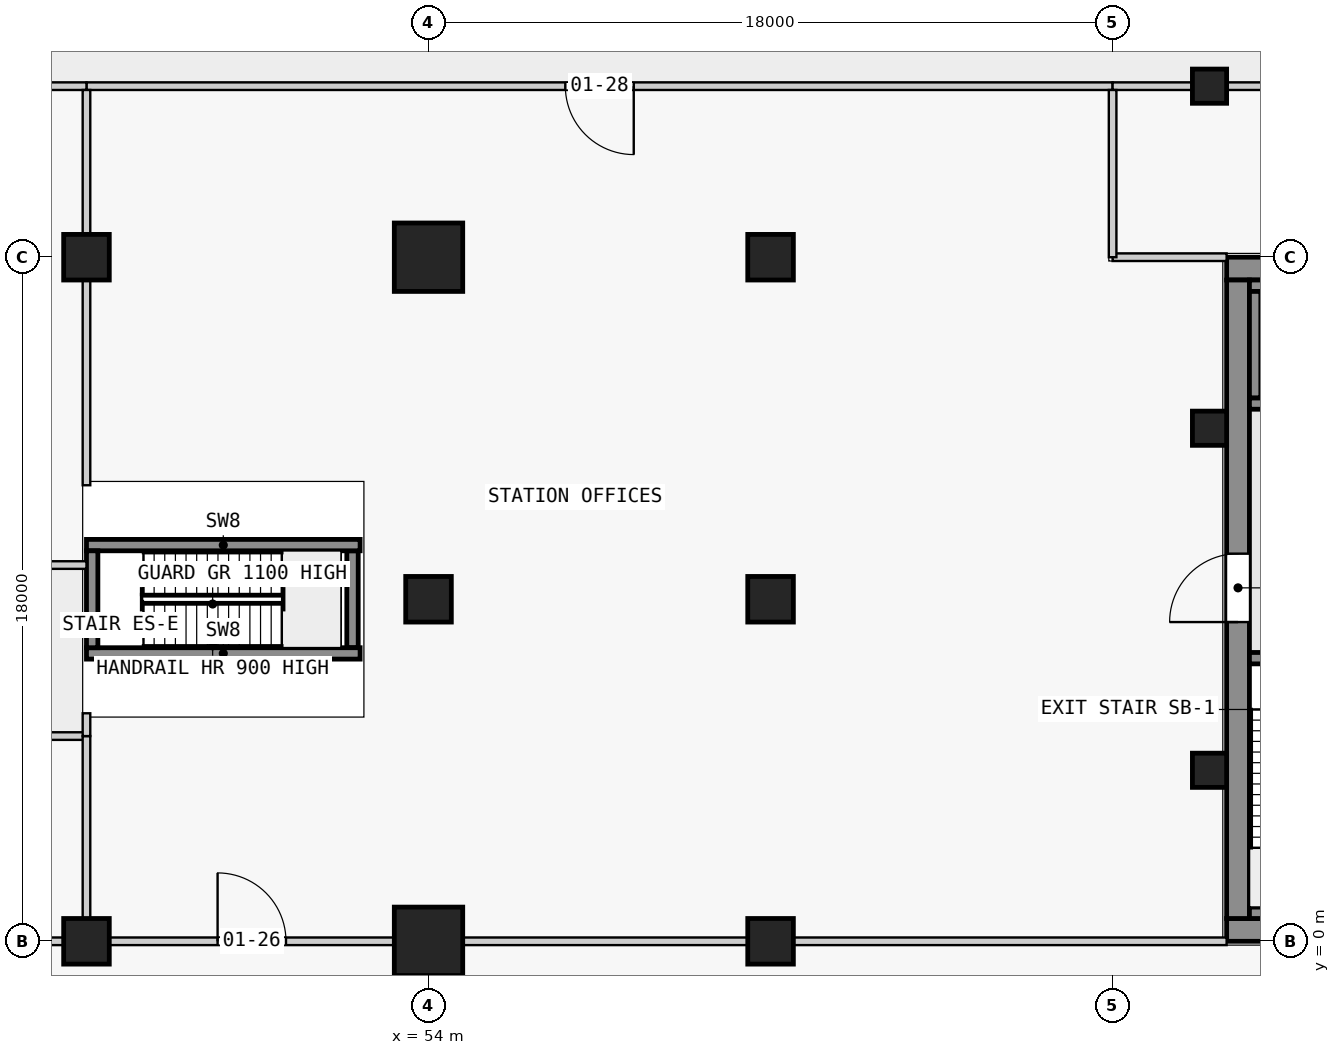
"""IFC4 building model, lengths in metres.
Left out: names, types, materials, properties, quantities, classifications, styles, units other than length and angle.
Written with IfcOpenShell. Run it as: python <this file> out.ifc"""

import sys

from ifc_helpers import new_model, si_unit, direction, frame, frame_2d, origin, origin_2d, place, context, subcontext, project, spatial, rectangle, extrude, element, fill, save


model = new_model("IFC4")
c1 = context("Model", 3, precision=1e-05, world=origin(), true_north=direction((0.0, 1.0)))
c2 = subcontext(c1, "Body", "Model", "MODEL_VIEW")
j1 = project(units=[si_unit("LENGTHUNIT", "METRE"), si_unit("PLANEANGLEUNIT", "RADIAN")], contexts=[c1])
p1 = place(None, origin())
s1 = spatial("IfcSite", under=j1, at=p1, CompositionType="ELEMENT")
p2 = place(p1, origin())
s2 = spatial("IfcBuilding", under=s1, at=p2, CompositionType="ELEMENT")
p3 = place(p2, frame((0.0, 0.0, 8.0)))
s3 = spatial("IfcBuildingStorey", under=s2, at=p3, CompositionType="ELEMENT", Elevation=8.0)
for number, where, z_axis, x_axis in (
    (1, (45.0, 0.0, 0.0), (0.0, 0.0, 1.0), (1.0, 0.0, 0.0)),
    (2, (45.0, 18.0, 0.0), (0.0, 0.0, 1.0), (1.0, 0.0, 0.0)),
):
    element("IfcColumn", number, at=place(p3, frame(where, z_axis=z_axis, x_axis=x_axis)), inside=s3, PredefinedType="COLUMN", context=c2, shape_type="SweptSolid", body=[
        extrude(rectangle(XDim=1.2, YDim=1.2, at=origin_2d()), origin(), (0.0, 0.0, 1.0), 4.8),
    ])
p4 = place(p3, frame((54.0, 0.0, 0.0), z_axis=(0.0, 0.0, 1.0), x_axis=(1.0, 0.0, 0.0)))
e3 = element("IfcColumn", 3, at=p4, inside=s3, PredefinedType="COLUMN", context=c2, shape_type="SweptSolid", body=[
    extrude(rectangle(XDim=1.8, YDim=1.8, at=origin_2d()), origin(), (0.0, 0.0, 1.0), 4.8),
])
p5 = place(p3, frame((54.0, 9.0, 0.0), z_axis=(0.0, 0.0, 1.0), x_axis=(1.0, 0.0, 0.0)))
e4 = element("IfcColumn", 4, at=p5, inside=s3, PredefinedType="COLUMN", context=c2, shape_type="SweptSolid", body=[
    extrude(rectangle(XDim=1.2, YDim=1.2, at=origin_2d()), origin(), (0.0, 0.0, 1.0), 4.8),
])
p6 = place(p3, frame((54.0, 18.0, 0.0), z_axis=(0.0, 0.0, 1.0), x_axis=(1.0, 0.0, 0.0)))
e5 = element("IfcColumn", 5, at=p6, inside=s3, PredefinedType="COLUMN", context=c2, shape_type="SweptSolid", body=[
    extrude(rectangle(XDim=1.8, YDim=1.8, at=origin_2d()), origin(), (0.0, 0.0, 1.0), 4.8),
])
for number, where, z_axis, x_axis in (
    (6, (63.0, 0.0, 0.0), (0.0, 0.0, 1.0), (1.0, 0.0, 0.0)),
    (7, (63.0, 9.0, 0.0), (0.0, 0.0, 1.0), (1.0, 0.0, 0.0)),
    (8, (63.0, 18.0, 0.0), (0.0, 0.0, 1.0), (1.0, 0.0, 0.0)),
):
    element("IfcColumn", number, at=place(p3, frame(where, z_axis=z_axis, x_axis=x_axis)), inside=s3, PredefinedType="COLUMN", context=c2, shape_type="SweptSolid", body=[
        extrude(rectangle(XDim=1.2, YDim=1.2, at=origin_2d()), origin(), (0.0, 0.0, 1.0), 4.8),
    ])
for number, where, z_axis, x_axis in (
    (9, (74.55, 22.5, 0.0), (0.0, 0.0, 1.0), (1.0, 0.0, 0.0)),
    (10, (74.55, 13.5, 0.0), (0.0, 0.0, 1.0), (1.0, 0.0, 0.0)),
    (11, (74.55, 4.5, 0.0), (0.0, 0.0, 1.0), (1.0, 0.0, 0.0)),
):
    element("IfcColumn", number, at=place(p3, frame(where, z_axis=z_axis, x_axis=x_axis)), inside=s3, PredefinedType="COLUMN", context=c2, shape_type="SweptSolid", body=[
        extrude(rectangle(XDim=0.9, YDim=0.9, at=origin_2d()), origin(), (0.0, 0.0, 1.0), 4.8),
    ])
for number, where, z_axis, x_axis in (
    (12, (75.0, 0.3, 0.0), (0.0, 0.0, 1.0), (1.0, 0.0, 0.0)),
    (13, (75.0, 17.7, 0.0), (0.0, 0.0, 1.0), (1.0, 0.0, 0.0)),
):
    element("IfcWall", number, at=place(p3, frame(where, z_axis=z_axis, x_axis=x_axis)), inside=s3, PredefinedType="SHEAR", context=c2, shape_type="SweptSolid", body=[
        extrude(rectangle(XDim=14.5, YDim=0.6, at=frame_2d((7.25, 0.0))), origin(), (0.0, 0.0, 1.0), 4.45),
    ])
p7 = place(p3, frame((75.3, 0.6, 0.0), z_axis=(0.0, 0.0, 1.0), x_axis=(0.0, 1.0, 0.0)))
e14 = element("IfcWall", 14, at=p7, inside=s3, PredefinedType="SHEAR", context=c2, shape_type="SweptSolid", body=[
    extrude(rectangle(XDim=16.8, YDim=0.6, at=frame_2d((8.4, 0.0))), origin(), (0.0, 0.0, 1.0), 4.45),
])
p8 = place(p7, frame((7.8, 0.0, 0.0)))
e15 = element("IfcOpeningElement", 15, at=p8, cuts=e14, PredefinedType="OPENING", context=c2, shape_type="SweptSolid", body=[
    extrude(rectangle(XDim=1.8, YDim=2.1, at=frame_2d((0.9, 1.05))), frame((0.0, 0.31, 0.0), z_axis=(0.0, -1.0, 0.0), x_axis=(1.0, 0.0, 0.0)), (0.0, 0.0, 1.0), 0.62),
])
p9 = place(p3, frame((75.6, 0.75, 0.0), z_axis=(0.0, 0.0, 1.0), x_axis=(1.0, 0.0, 0.0)))
e16 = element("IfcWall", 16, at=p9, inside=s3, PredefinedType="SHEAR", context=c2, shape_type="SweptSolid", body=[
    extrude(rectangle(XDim=5.7, YDim=0.3, at=frame_2d((2.85, 0.0))), origin(), (0.0, 0.0, 1.0), 4.45),
])
p10 = place(p3, frame((75.6, 7.45, 0.0), z_axis=(0.0, 0.0, 1.0), x_axis=(1.0, 0.0, 0.0)))
e17 = element("IfcWall", 17, at=p10, inside=s3, PredefinedType="SHEAR", context=c2, shape_type="SweptSolid", body=[
    extrude(rectangle(XDim=5.7, YDim=0.3, at=frame_2d((2.85, 0.0))), origin(), (0.0, 0.0, 1.0), 4.45),
])
p11 = place(p10, frame((0.75, 0.0, 0.0)))
e18 = element("IfcOpeningElement", 18, at=p11, cuts=e17, PredefinedType="OPENING", context=c2, shape_type="SweptSolid", body=[
    extrude(rectangle(XDim=1.1, YDim=2.1, at=frame_2d((0.55, 1.05))), frame((0.0, 0.16, 0.0), z_axis=(0.0, -1.0, 0.0), x_axis=(1.0, 0.0, 0.0)), (0.0, 0.0, 1.0), 0.32),
])
p12 = place(p10, frame((3.55, 0.0, 0.0)))
e19 = element("IfcOpeningElement", 19, at=p12, cuts=e17, PredefinedType="OPENING", context=c2, shape_type="SweptSolid", body=[
    extrude(rectangle(XDim=1.1, YDim=2.1, at=frame_2d((0.55, 1.05))), frame((0.0, 0.16, 0.0), z_axis=(0.0, -1.0, 0.0), x_axis=(1.0, 0.0, 0.0)), (0.0, 0.0, 1.0), 0.32),
])
p13 = place(p3, frame((75.6, 17.25, 0.0), z_axis=(0.0, 0.0, 1.0), x_axis=(1.0, 0.0, 0.0)))
e20 = element("IfcWall", 20, at=p13, inside=s3, PredefinedType="SHEAR", context=c2, shape_type="SweptSolid", body=[
    extrude(rectangle(XDim=9.9, YDim=0.3, at=frame_2d((4.95, 0.0))), origin(), (0.0, 0.0, 1.0), 4.45),
])
p14 = place(p3, frame((75.6, 14.15, 0.0), z_axis=(0.0, 0.0, 1.0), x_axis=(1.0, 0.0, 0.0)))
e21 = element("IfcWall", 21, at=p14, inside=s3, PredefinedType="SHEAR", context=c2, shape_type="SweptSolid", body=[
    extrude(rectangle(XDim=9.9, YDim=0.3, at=frame_2d((4.95, 0.0))), origin(), (0.0, 0.0, 1.0), 4.45),
])
p15 = place(p14, frame((0.85, 0.0, 0.0)))
e22 = element("IfcOpeningElement", 22, at=p15, cuts=e21, PredefinedType="OPENING", context=c2, shape_type="SweptSolid", body=[
    extrude(rectangle(XDim=1.1, YDim=2.1, at=frame_2d((0.55, 1.05))), frame((0.0, 0.16, 0.0), z_axis=(0.0, -1.0, 0.0), x_axis=(1.0, 0.0, 0.0)), (0.0, 0.0, 1.0), 0.32),
])
p16 = place(p14, frame((3.35, 0.0, 0.0)))
e23 = element("IfcOpeningElement", 23, at=p16, cuts=e21, PredefinedType="OPENING", context=c2, shape_type="SweptSolid", body=[
    extrude(rectangle(XDim=1.1, YDim=2.1, at=frame_2d((0.55, 1.05))), frame((0.0, 0.16, 0.0), z_axis=(0.0, -1.0, 0.0), x_axis=(1.0, 0.0, 0.0)), (0.0, 0.0, 1.0), 0.32),
])
p17 = place(p14, frame((5.75, 0.0, 0.0)))
e24 = element("IfcOpeningElement", 24, at=p17, cuts=e21, PredefinedType="OPENING", context=c2, shape_type="SweptSolid", body=[
    extrude(rectangle(XDim=1.1, YDim=2.1, at=frame_2d((0.55, 1.05))), frame((0.0, 0.16, 0.0), z_axis=(0.0, -1.0, 0.0), x_axis=(1.0, 0.0, 0.0)), (0.0, 0.0, 1.0), 0.32),
])
p18 = place(p14, frame((8.05, 0.0, 0.0)))
e25 = element("IfcOpeningElement", 25, at=p18, cuts=e21, PredefinedType="OPENING", context=c2, shape_type="SweptSolid", body=[
    extrude(rectangle(XDim=1.1, YDim=2.1, at=frame_2d((0.55, 1.05))), frame((0.0, 0.16, 0.0), z_axis=(0.0, -1.0, 0.0), x_axis=(1.0, 0.0, 0.0)), (0.0, 0.0, 1.0), 0.32),
])
p19 = place(p3, frame((75.75, 14.3, 0.0), z_axis=(0.0, 0.0, 1.0), x_axis=(0.0, 1.0, 0.0)))
e26 = element("IfcWall", 26, at=p19, inside=s3, PredefinedType="SHEAR", context=c2, shape_type="SweptSolid", body=[
    extrude(rectangle(XDim=2.8, YDim=0.3, at=frame_2d((1.4, 0.0))), origin(), (0.0, 0.0, 1.0), 4.45),
])
for number, where, z_axis, x_axis in (
    (27, (45.15, 7.725, 0.0), (0.0, 0.0, 1.0), (0.0, 1.0, 0.0)),
    (28, (52.0, 7.725, 0.0), (0.0, 0.0, 1.0), (0.0, 1.0, 0.0)),
):
    element("IfcWall", number, at=place(p3, frame(where, z_axis=z_axis, x_axis=x_axis)), inside=s3, PredefinedType="SHEAR", context=c2, shape_type="SweptSolid", body=[
        extrude(rectangle(XDim=2.55, YDim=0.3, at=frame_2d((1.275, 0.0))), origin(), (0.0, 0.0, 1.0), 4.8),
    ])
for number, where, z_axis, x_axis in (
    (29, (45.0, 7.575, 0.0), (0.0, 0.0, 1.0), (1.0, 0.0, 0.0)),
    (30, (45.0, 10.425, 0.0), (0.0, 0.0, 1.0), (1.0, 0.0, 0.0)),
):
    element("IfcWall", number, at=place(p3, frame(where, z_axis=z_axis, x_axis=x_axis)), inside=s3, PredefinedType="SHEAR", context=c2, shape_type="SweptSolid", body=[
        extrude(rectangle(XDim=7.2, YDim=0.3, at=frame_2d((3.6, 0.0))), origin(), (0.0, 0.0, 1.0), 4.8),
    ])
p20 = place(p3, frame((45.6, 0.0, 0.0), z_axis=(0.0, 0.0, 1.0), x_axis=(1.0, 0.0, 0.0)))
e31 = element("IfcWall", 31, at=p20, inside=s3, PredefinedType="PARTITIONING", context=c2, shape_type="SweptSolid", body=[
    extrude(rectangle(XDim=7.5, YDim=0.2, at=frame_2d((3.75, 0.0))), origin(), (0.0, 0.0, 1.0), 3.75),
])
p21 = place(p20, frame((2.85, 0.0, 0.0)))
e32 = element("IfcOpeningElement", 32, at=p21, cuts=e31, PredefinedType="OPENING", context=c2, shape_type="SweptSolid", body=[
    extrude(rectangle(XDim=1.8, YDim=2.1, at=frame_2d((0.9, 1.05))), frame((0.0, 0.11, 0.0), z_axis=(0.0, -1.0, 0.0), x_axis=(1.0, 0.0, 0.0)), (0.0, 0.0, 1.0), 0.22),
])
p22 = place(p3, frame((54.9, 0.0, 0.0), z_axis=(0.0, 0.0, 1.0), x_axis=(1.0, 0.0, 0.0)))
e33 = element("IfcWall", 33, at=p22, inside=s3, PredefinedType="PARTITIONING", context=c2, shape_type="SweptSolid", body=[
    extrude(rectangle(XDim=7.5, YDim=0.2, at=frame_2d((3.75, 0.0))), origin(), (0.0, 0.0, 1.0), 3.75),
])
p23 = place(p3, frame((63.6, 0.0, 0.0), z_axis=(0.0, 0.0, 1.0), x_axis=(1.0, 0.0, 0.0)))
e34 = element("IfcWall", 34, at=p23, inside=s3, PredefinedType="PARTITIONING", context=c2, shape_type="SweptSolid", body=[
    extrude(rectangle(XDim=11.4, YDim=0.2, at=frame_2d((5.7, 0.0))), origin(), (0.0, 0.0, 1.0), 4.45),
])
p24 = place(p3, frame((72.0, 22.5, 0.0), z_axis=(0.0, 0.0, 1.0), x_axis=(-1.0, 0.0, 0.0)))
e35 = element("IfcWall", 35, at=p24, inside=s3, PredefinedType="PARTITIONING", context=c2, shape_type="SweptSolid", body=[
    extrude(rectangle(XDim=27.0, YDim=0.2, at=frame_2d((13.5, 0.0))), origin(), (0.0, 0.0, 1.0), 3.75),
])
p25 = place(p24, frame((12.6, 0.0, 0.0)))
e36 = element("IfcOpeningElement", 36, at=p25, cuts=e35, PredefinedType="OPENING", context=c2, shape_type="SweptSolid", body=[
    extrude(rectangle(XDim=1.8, YDim=2.1, at=frame_2d((0.9, 1.05))), frame((0.0, 0.11, 0.0), z_axis=(0.0, -1.0, 0.0), x_axis=(1.0, 0.0, 0.0)), (0.0, 0.0, 1.0), 0.22),
])
p26 = place(p3, frame((82.05, 22.5, 0.0), z_axis=(0.0, 0.0, 1.0), x_axis=(-1.0, 0.0, 0.0)))
e37 = element("IfcWall", 37, at=p26, inside=s3, PredefinedType="PARTITIONING", context=c2, shape_type="SweptSolid", body=[
    extrude(rectangle(XDim=7.05, YDim=0.2, at=frame_2d((3.525, 0.0))), origin(), (0.0, 0.0, 1.0), 4.45),
])
p27 = place(p3, frame((74.1, 22.5, 0.0), z_axis=(0.0, 0.0, 1.0), x_axis=(-1.0, 0.0, 0.0)))
e38 = element("IfcWall", 38, at=p27, inside=s3, PredefinedType="PARTITIONING", context=c2, shape_type="SweptSolid", body=[
    extrude(rectangle(XDim=2.1, YDim=0.2, at=frame_2d((1.05, 0.0))), origin(), (0.0, 0.0, 1.0), 4.45),
])
p28 = place(p3, frame((45.0, 22.5, 0.0), z_axis=(0.0, 0.0, 1.0), x_axis=(-1.0, 0.0, 0.0)))
e39 = element("IfcWall", 39, at=p28, inside=s3, PredefinedType="PARTITIONING", context=c2, shape_type="SweptSolid", body=[
    extrude(rectangle(XDim=18.0, YDim=0.2, at=frame_2d((9.0, 0.0))), origin(), (0.0, 0.0, 1.0), 3.75),
])
p29 = place(p28, frame((8.1, 0.0, 0.0)))
e40 = element("IfcOpeningElement", 40, at=p29, cuts=e39, PredefinedType="OPENING", context=c2, shape_type="SweptSolid", body=[
    extrude(rectangle(XDim=1.8, YDim=2.1, at=frame_2d((0.9, 1.05))), frame((0.0, 0.11, 0.0), z_axis=(0.0, -1.0, 0.0), x_axis=(1.0, 0.0, 0.0)), (0.0, 0.0, 1.0), 0.22),
])
p30 = place(p3, frame((36.9, 0.0, 0.0), z_axis=(0.0, 0.0, 1.0), x_axis=(1.0, 0.0, 0.0)))
e41 = element("IfcWall", 41, at=p30, inside=s3, PredefinedType="PARTITIONING", context=c2, shape_type="SweptSolid", body=[
    extrude(rectangle(XDim=7.5, YDim=0.2, at=frame_2d((3.75, 0.0))), origin(), (0.0, 0.0, 1.0), 3.75),
])
p31 = place(p3, frame((27.0, 9.9, 0.0), z_axis=(0.0, 0.0, 1.0), x_axis=(1.0, 0.0, 0.0)))
e42 = element("IfcWall", 42, at=p31, inside=s3, PredefinedType="PARTITIONING", context=c2, shape_type="SweptSolid", body=[
    extrude(rectangle(XDim=18.0, YDim=0.2, at=frame_2d((9.0, 0.0))), origin(), (0.0, 0.0, 1.0), 3.75),
])
p32 = place(p31, frame((6.35, 0.0, 0.0)))
e43 = element("IfcOpeningElement", 43, at=p32, cuts=e42, PredefinedType="OPENING", context=c2, shape_type="SweptSolid", body=[
    extrude(rectangle(XDim=1.8, YDim=2.1, at=frame_2d((0.9, 1.05))), frame((0.0, 0.11, 0.0), z_axis=(0.0, -1.0, 0.0), x_axis=(1.0, 0.0, 0.0)), (0.0, 0.0, 1.0), 0.22),
])
p33 = place(p3, frame((45.0, 5.4, 0.0), z_axis=(0.0, 0.0, 1.0), x_axis=(-1.0, 0.0, 0.0)))
e44 = element("IfcWall", 44, at=p33, inside=s3, PredefinedType="PARTITIONING", context=c2, shape_type="SweptSolid", body=[
    extrude(rectangle(XDim=18.0, YDim=0.2, at=frame_2d((9.0, 0.0))), origin(), (0.0, 0.0, 1.0), 3.75),
])
p34 = place(p3, frame((45.0, 22.4, 0.0), z_axis=(0.0, 0.0, 1.0), x_axis=(0.0, -1.0, 0.0)))
e45 = element("IfcWall", 45, at=p34, inside=s3, PredefinedType="PARTITIONING", context=c2, shape_type="SweptSolid", body=[
    extrude(rectangle(XDim=3.8, YDim=0.2, at=frame_2d((1.9, 0.0))), origin(), (0.0, 0.0, 1.0), 3.75),
])
p35 = place(p3, frame((45.0, 17.4, 0.0), z_axis=(0.0, 0.0, 1.0), x_axis=(0.0, -1.0, 0.0)))
e46 = element("IfcWall", 46, at=p35, inside=s3, PredefinedType="PARTITIONING", context=c2, shape_type="SweptSolid", body=[
    extrude(rectangle(XDim=5.4, YDim=0.2, at=frame_2d((2.7, 0.0))), origin(), (0.0, 0.0, 1.0), 4.45),
])
p36 = place(p3, frame((75.0, 18.0, 0.0), z_axis=(0.0, 0.0, 1.0), x_axis=(-1.0, 0.0, 0.0)))
e47 = element("IfcWall", 47, at=p36, inside=s3, PredefinedType="PARTITIONING", context=c2, shape_type="SweptSolid", body=[
    extrude(rectangle(XDim=3.0, YDim=0.2, at=frame_2d((1.5, 0.0))), origin(), (0.0, 0.0, 1.0), 4.45),
])
p37 = place(p3, frame((72.0, 18.0, 0.0), z_axis=(0.0, 0.0, 1.0), x_axis=(0.0, 1.0, 0.0)))
e48 = element("IfcWall", 48, at=p37, inside=s3, PredefinedType="PARTITIONING", context=c2, shape_type="SweptSolid", body=[
    extrude(rectangle(XDim=4.4, YDim=0.2, at=frame_2d((2.2, 0.0))), origin(), (0.0, 0.0, 1.0), 4.45),
])
p38 = place(p3, frame((45.0, 5.4, 0.0), z_axis=(0.0, 0.0, 1.0), x_axis=(0.0, -1.0, 0.0)))
e49 = element("IfcWall", 49, at=p38, inside=s3, PredefinedType="PARTITIONING", context=c2, shape_type="SweptSolid", body=[
    extrude(rectangle(XDim=4.8, YDim=0.2, at=frame_2d((2.4, 0.0))), origin(), (0.0, 0.0, 1.0), 4.45),
])
p39 = place(p3, frame((45.0, 6.0, 0.0), z_axis=(0.0, 0.0, 1.0), x_axis=(0.0, -1.0, 0.0)))
e50 = element("IfcWall", 50, at=p39, inside=s3, PredefinedType="PARTITIONING", context=c2, shape_type="SweptSolid", body=[
    extrude(rectangle(XDim=0.6, YDim=0.2, at=frame_2d((0.3, 0.0))), origin(), (0.0, 0.0, 1.0), 4.45),
])
p40 = place(p8, origin())
e51 = element("IfcDoor", 51, at=p40, inside=s3, OperationType="DOUBLE_DOOR_SINGLE_SWING", PredefinedType="DOOR", context=c2, shape_type="SweptSolid", body=[
    extrude(rectangle(XDim=1.8, YDim=2.1, at=frame_2d((0.9, 1.05))), frame((0.0, 0.025, 0.0), z_axis=(0.0, -1.0, 0.0), x_axis=(1.0, 0.0, 0.0)), (0.0, 0.0, 1.0), 0.05),
])
fill(e15, e51)
p41 = place(p21, origin())
e52 = element("IfcDoor", 52, at=p41, inside=s3, OperationType="DOUBLE_DOOR_SINGLE_SWING", PredefinedType="DOOR", context=c2, shape_type="SweptSolid", body=[
    extrude(rectangle(XDim=1.8, YDim=2.1, at=frame_2d((0.9, 1.05))), frame((0.0, 0.025, 0.0), z_axis=(0.0, -1.0, 0.0), x_axis=(1.0, 0.0, 0.0)), (0.0, 0.0, 1.0), 0.05),
])
fill(e32, e52)
p42 = place(p25, origin())
e53 = element("IfcDoor", 53, at=p42, inside=s3, OperationType="DOUBLE_DOOR_SINGLE_SWING", PredefinedType="DOOR", context=c2, shape_type="SweptSolid", body=[
    extrude(rectangle(XDim=1.8, YDim=2.1, at=frame_2d((0.9, 1.05))), frame((0.0, 0.025, 0.0), z_axis=(0.0, -1.0, 0.0), x_axis=(1.0, 0.0, 0.0)), (0.0, 0.0, 1.0), 0.05),
])
fill(e36, e53)
save(model, sys.argv[1])
